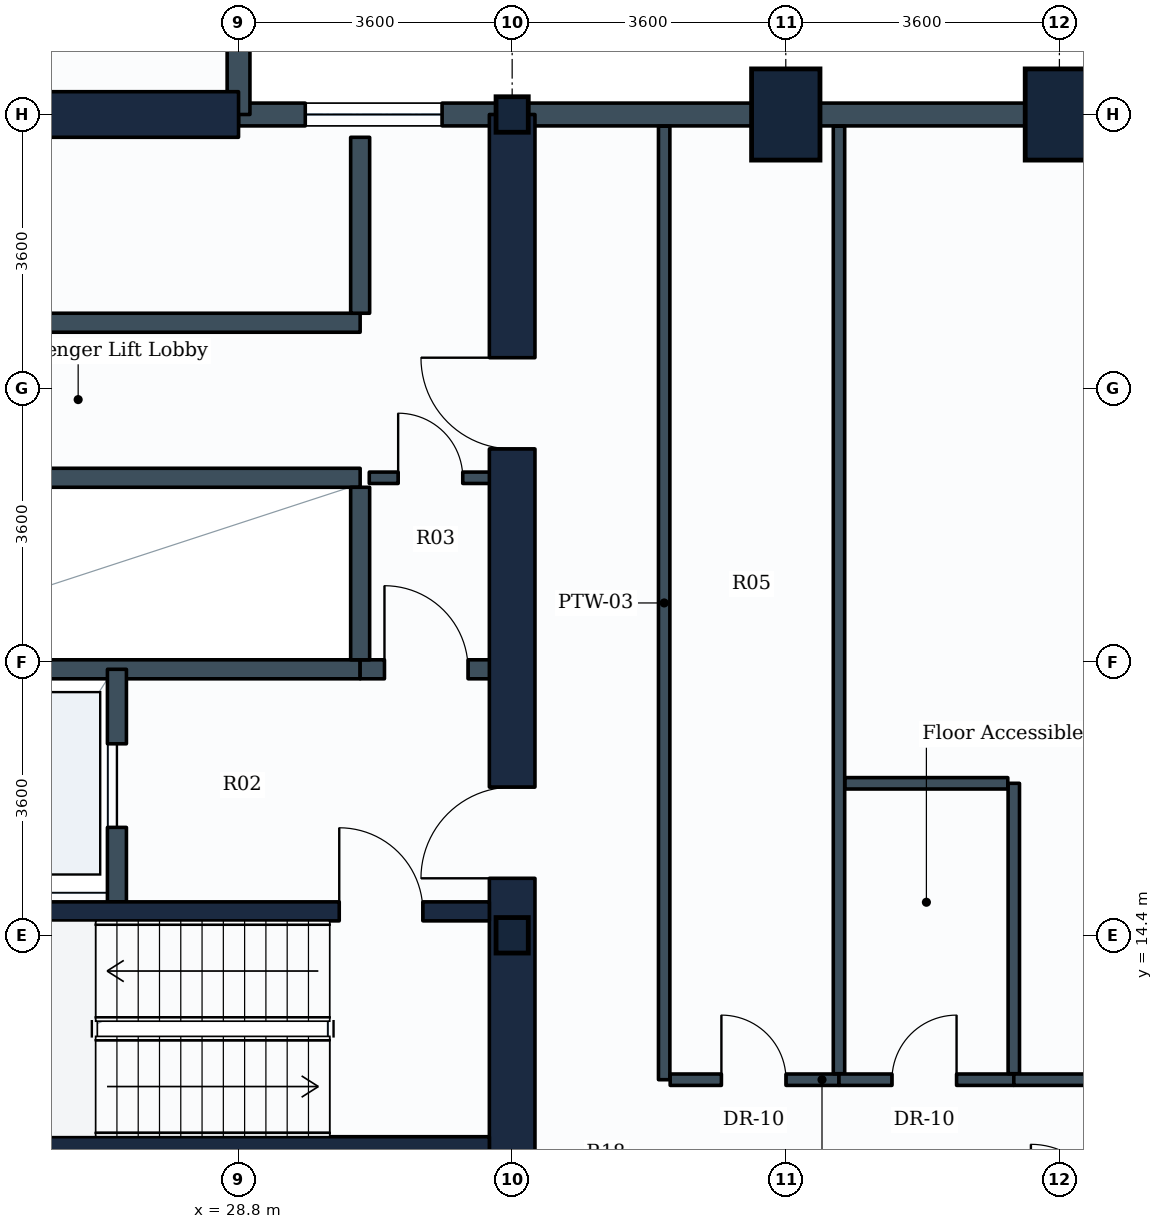
"""IFC4 building model, lengths in metres.
Left out: names, types, materials, properties, quantities, classifications, styles, units other than length and angle.
Written with IfcOpenShell. Run it as: python <this file> out.ifc"""

import sys

from ifc_helpers import new_model, si_unit, direction, frame, frame_2d, origin, origin_2d, place, context, subcontext, project, spatial, rectangle, i_section, extrude, element, fill, save


model = new_model("IFC4")
c1 = context("Model", 3, precision=1e-05, world=origin(), true_north=direction((0.0, 1.0)))
c2 = subcontext(c1, "Body", "Model", "MODEL_VIEW")
j1 = project(units=[si_unit("LENGTHUNIT", "METRE"), si_unit("PLANEANGLEUNIT", "RADIAN")], contexts=[c1])
p1 = place(None, origin())
s1 = spatial("IfcSite", under=j1, at=p1, CompositionType="ELEMENT")
p2 = place(p1, origin())
s2 = spatial("IfcBuilding", under=s1, at=p2, CompositionType="ELEMENT")
p3 = place(p2, frame((0.0, 0.0, 31.8)))
s3 = spatial("IfcBuildingStorey", under=s2, at=p3, CompositionType="ELEMENT", Elevation=31.8)
for number, where, z_axis, x_axis in (
    (1, (32.4, 14.4, 0.0), (0.0, 0.0, 1.0), (1.0, 0.0, 0.0)),
    (2, (32.4, 25.2, 0.0), (0.0, 0.0, 1.0), (1.0, 0.0, 0.0)),
):
    element("IfcColumn", number, at=place(p3, frame(where, z_axis=z_axis, x_axis=x_axis)), inside=s3, PredefinedType="COLUMN", context=c2, shape_type="SweptSolid", body=[
        extrude(i_section(OverallWidth=0.424, OverallDepth=0.467, WebThickness=0.033, FlangeThickness=0.053, FilletRadius=0.015, at=origin_2d()), origin(), (0.0, 0.0, 1.0), 3.9),
    ])
for number, where, z_axis, x_axis in (
    (3, (36.0, 25.2, 0.0), (0.0, 0.0, 1.0), (1.0, 0.0, 0.0)),
    (4, (39.6, 25.2, 0.0), (0.0, 0.0, 1.0), (1.0, 0.0, 0.0)),
):
    element("IfcColumn", number, at=place(p3, frame(where, z_axis=z_axis, x_axis=x_axis)), inside=s3, PredefinedType="COLUMN", context=c2, shape_type="SweptSolid", body=[
        extrude(rectangle(XDim=0.9, YDim=1.2, at=origin_2d()), origin(), (0.0, 0.0, 1.0), 3.9),
    ])
p4 = place(p3, frame((39.6, 25.2, 0.0), z_axis=(0.0, 0.0, 1.0), x_axis=(1.0, 0.0, 0.0)))
e5 = element("IfcWall", 5, at=p4, inside=s3, PredefinedType="STANDARD", context=c2, shape_type="SweptSolid", body=[
    extrude(rectangle(XDim=3.6, YDim=0.3, at=frame_2d((1.8, 0.0))), origin(), (0.0, 0.0, 1.0), 2.93),
])
p5 = place(p4, frame((0.9, 0.0, 0.85)))
e6 = element("IfcOpeningElement", 6, at=p5, cuts=e5, PredefinedType="OPENING", context=c2, shape_type="SweptSolid", body=[
    extrude(rectangle(XDim=1.8, YDim=1.35, at=frame_2d((0.9, 0.675))), frame((0.0, 0.16, 0.0), z_axis=(0.0, -1.0, 0.0), x_axis=(1.0, 0.0, 0.0)), (0.0, 0.0, 1.0), 0.32),
])
for number, where, z_axis, x_axis in (
    (7, (36.0, 25.2, 0.0), (0.0, 0.0, 1.0), (1.0, 0.0, 0.0)),
    (8, (32.4, 25.2, 0.0), (0.0, 0.0, 1.0), (1.0, 0.0, 0.0)),
):
    element("IfcWall", number, at=place(p3, frame(where, z_axis=z_axis, x_axis=x_axis)), inside=s3, PredefinedType="STANDARD", context=c2, shape_type="SweptSolid", body=[
        extrude(rectangle(XDim=3.6, YDim=0.3, at=frame_2d((1.8, 0.0))), origin(), (0.0, 0.0, 1.0), 2.93),
    ])
p6 = place(p3, frame((28.8, 25.2, 0.0), z_axis=(0.0, 0.0, 1.0), x_axis=(1.0, 0.0, 0.0)))
e9 = element("IfcWall", 9, at=p6, inside=s3, PredefinedType="STANDARD", context=c2, shape_type="SweptSolid", body=[
    extrude(rectangle(XDim=3.6, YDim=0.3, at=frame_2d((1.8, 0.0))), origin(), (0.0, 0.0, 1.0), 3.635),
])
p7 = place(p6, frame((0.878, 0.0, 0.85)))
e10 = element("IfcOpeningElement", 10, at=p7, cuts=e9, PredefinedType="OPENING", context=c2, shape_type="SweptSolid", body=[
    extrude(rectangle(XDim=1.8, YDim=1.35, at=frame_2d((0.9, 0.675))), frame((0.0, 0.16, 0.0), z_axis=(0.0, -1.0, 0.0), x_axis=(1.0, 0.0, 0.0)), (0.0, 0.0, 1.0), 0.32),
])
p8 = place(p3, frame((28.8, 25.2, 0.0), z_axis=(0.0, 0.0, 1.0), x_axis=(0.0, 1.0, 0.0)))
e11 = element("IfcWall", 11, at=p8, inside=s3, PredefinedType="STANDARD", context=c2, shape_type="SweptSolid", body=[
    extrude(rectangle(XDim=3.6, YDim=0.3, at=frame_2d((1.8, 0.0))), origin(), (0.0, 0.0, 1.0), 3.14),
])
p9 = place(p3, frame((14.4, 25.2, 0.0), z_axis=(0.0, 0.0, 1.0), x_axis=(1.0, 0.0, 0.0)))
e12 = element("IfcWall", 12, at=p9, inside=s3, PredefinedType="SHEAR", context=c2, shape_type="SweptSolid", body=[
    extrude(rectangle(XDim=14.4, YDim=0.6, at=frame_2d((7.2, 0.0))), origin(), (0.0, 0.0, 1.0), 3.65),
])
p10 = place(p3, frame((32.4, 10.8, 0.0), z_axis=(0.0, 0.0, 1.0), x_axis=(0.0, 1.0, 0.0)))
e13 = element("IfcWall", 13, at=p10, inside=s3, PredefinedType="SHEAR", context=c2, shape_type="SweptSolid", body=[
    extrude(rectangle(XDim=14.4, YDim=0.6, at=frame_2d((7.2, 0.0))), origin(), (0.0, 0.0, 1.0), 3.65),
])
p11 = place(p10, frame((4.35, 0.0, 0.0)))
e14 = element("IfcOpeningElement", 14, at=p11, cuts=e13, PredefinedType="OPENING", context=c2, shape_type="SweptSolid", body=[
    extrude(rectangle(XDim=1.2, YDim=2.1, at=frame_2d((0.6, 1.05))), frame((0.0, 0.31, 0.0), z_axis=(0.0, -1.0, 0.0), x_axis=(1.0, 0.0, 0.0)), (0.0, 0.0, 1.0), 0.62),
])
p12 = place(p10, frame((10.0, 0.0, 0.0)))
e15 = element("IfcOpeningElement", 15, at=p12, cuts=e13, PredefinedType="OPENING", context=c2, shape_type="SweptSolid", body=[
    extrude(rectangle(XDim=1.2, YDim=2.1, at=frame_2d((0.6, 1.05))), frame((0.0, 0.31, 0.0), z_axis=(0.0, -1.0, 0.0), x_axis=(1.0, 0.0, 0.0)), (0.0, 0.0, 1.0), 0.62),
])
p13 = place(p3, frame((23.35, 11.625, 0.0), z_axis=(0.0, 0.0, 1.0), x_axis=(1.0, 0.0, 0.0)))
e16 = element("IfcWall", 16, at=p13, inside=s3, PredefinedType="SHEAR", context=c2, shape_type="SweptSolid", body=[
    extrude(rectangle(XDim=8.75, YDim=0.25, at=frame_2d((4.375, 0.0))), origin(), (0.0, 0.0, 1.0), 3.65),
])
p14 = place(p3, frame((23.35, 14.715, 0.0), z_axis=(0.0, 0.0, 1.0), x_axis=(1.0, 0.0, 0.0)))
e17 = element("IfcWall", 17, at=p14, inside=s3, PredefinedType="SHEAR", context=c2, shape_type="SweptSolid", body=[
    extrude(rectangle(XDim=8.75, YDim=0.25, at=frame_2d((4.375, 0.0))), origin(), (0.0, 0.0, 1.0), 3.65),
])
p15 = place(p14, frame((6.775, 0.0, 0.0)))
e18 = element("IfcOpeningElement", 18, at=p15, cuts=e17, PredefinedType="OPENING", context=c2, shape_type="SweptSolid", body=[
    extrude(rectangle(XDim=1.1, YDim=2.1, at=frame_2d((0.55, 1.05))), frame((0.0, 0.135, 0.0), z_axis=(0.0, -1.0, 0.0), x_axis=(1.0, 0.0, 0.0)), (0.0, 0.0, 1.0), 0.27),
])
p16 = place(p3, frame((21.88, 17.9, 0.0), z_axis=(0.0, 0.0, 1.0), x_axis=(1.0, 0.0, 0.0)))
e19 = element("IfcWall", 19, at=p16, inside=s3, PredefinedType="PARTITIONING", context=c2, shape_type="SweptSolid", body=[
    extrude(rectangle(XDim=8.52, YDim=0.25, at=frame_2d((4.26, 0.0))), origin(), (0.0, 0.0, 1.0), 3.635),
])
p17 = place(p3, frame((30.4, 17.9, 0.0), z_axis=(0.0, 0.0, 1.0), x_axis=(1.0, 0.0, 0.0)))
e20 = element("IfcWall", 20, at=p17, inside=s3, PredefinedType="PARTITIONING", context=c2, shape_type="SweptSolid", body=[
    extrude(rectangle(XDim=1.75, YDim=0.25, at=frame_2d((0.875, 0.0))), origin(), (0.0, 0.0, 1.0), 3.635),
])
p18 = place(p17, frame((0.32, 0.0, 0.0)))
e21 = element("IfcOpeningElement", 21, at=p18, cuts=e20, PredefinedType="OPENING", context=c2, shape_type="SweptSolid", body=[
    extrude(rectangle(XDim=1.1, YDim=2.1, at=frame_2d((0.55, 1.05))), frame((0.0, 0.135, 0.0), z_axis=(0.0, -1.0, 0.0), x_axis=(1.0, 0.0, 0.0)), (0.0, 0.0, 1.0), 0.27),
])
p19 = place(p3, frame((27.2, 14.84, 0.0), z_axis=(0.0, 0.0, 1.0), x_axis=(0.0, 1.0, 0.0)))
e22 = element("IfcWall", 22, at=p19, inside=s3, PredefinedType="PARTITIONING", context=c2, shape_type="SweptSolid", body=[
    extrude(rectangle(XDim=3.06, YDim=0.25, at=frame_2d((1.53, 0.0))), origin(), (0.0, 0.0, 1.0), 3.635),
])
p20 = place(p19, frame((0.98, 0.0, 0.0)))
e23 = element("IfcOpeningElement", 23, at=p20, cuts=e22, PredefinedType="OPENING", context=c2, shape_type="SweptSolid", body=[
    extrude(rectangle(XDim=1.1, YDim=2.1, at=frame_2d((0.55, 1.05))), frame((0.0, 0.135, 0.0), z_axis=(0.0, -1.0, 0.0), x_axis=(1.0, 0.0, 0.0)), (0.0, 0.0, 1.0), 0.27),
])
p21 = place(p3, frame((23.18, 20.42, 0.0), z_axis=(0.0, 0.0, 1.0), x_axis=(1.0, 0.0, 0.0)))
e24 = element("IfcWall", 24, at=p21, inside=s3, PredefinedType="PARTITIONING", context=c2, shape_type="SweptSolid", body=[
    extrude(rectangle(XDim=7.22, YDim=0.25, at=frame_2d((3.61, 0.0))), origin(), (0.0, 0.0, 1.0), 3.635),
])
p22 = place(p3, frame((30.4, 18.025, 0.0), z_axis=(0.0, 0.0, 1.0), x_axis=(0.0, 1.0, 0.0)))
e25 = element("IfcWall", 25, at=p22, inside=s3, PredefinedType="PARTITIONING", context=c2, shape_type="SweptSolid", body=[
    extrude(rectangle(XDim=2.27, YDim=0.25, at=frame_2d((1.135, 0.0))), origin(), (0.0, 0.0, 1.0), 3.635),
])
p23 = place(p3, frame((23.18, 22.46, 0.0), z_axis=(0.0, 0.0, 1.0), x_axis=(1.0, 0.0, 0.0)))
e26 = element("IfcWall", 26, at=p23, inside=s3, PredefinedType="PARTITIONING", context=c2, shape_type="SweptSolid", body=[
    extrude(rectangle(XDim=7.22, YDim=0.25, at=frame_2d((3.61, 0.0))), origin(), (0.0, 0.0, 1.0), 3.635),
])
p24 = place(p3, frame((30.4, 22.585, 0.0), z_axis=(0.0, 0.0, 1.0), x_axis=(0.0, 1.0, 0.0)))
e27 = element("IfcWall", 27, at=p24, inside=s3, PredefinedType="PARTITIONING", context=c2, shape_type="SweptSolid", body=[
    extrude(rectangle(XDim=2.315, YDim=0.25, at=frame_2d((1.157, 0.0))), origin(), (0.0, 0.0, 1.0), 3.635),
])
p25 = place(p3, frame((30.52, 20.42, 0.0), z_axis=(0.0, 0.0, 1.0), x_axis=(1.0, 0.0, 0.0)))
e28 = element("IfcWall", 28, at=p25, inside=s3, PredefinedType="PARTITIONING", context=c2, shape_type="SweptSolid", body=[
    extrude(rectangle(XDim=1.63, YDim=0.15, at=frame_2d((0.815, 0.0))), origin(), (0.0, 0.0, 1.0), 3.635),
])
p26 = place(p25, frame((0.38, 0.0, 0.0)))
e29 = element("IfcOpeningElement", 29, at=p26, cuts=e28, PredefinedType="OPENING", context=c2, shape_type="SweptSolid", body=[
    extrude(rectangle(XDim=0.85, YDim=2.1, at=frame_2d((0.425, 1.05))), frame((0.0, 0.085, 0.0), z_axis=(0.0, -1.0, 0.0), x_axis=(1.0, 0.0, 0.0)), (0.0, 0.0, 1.0), 0.17),
])
p27 = place(p3, frame((34.4, 12.5, 0.0), z_axis=(0.0, 0.0, 1.0), x_axis=(0.0, 1.0, 0.0)))
e30 = element("IfcWall", 30, at=p27, inside=s3, PredefinedType="PARTITIONING", context=c2, shape_type="SweptSolid", body=[
    extrude(rectangle(XDim=12.546, YDim=0.15, at=frame_2d((6.273, 0.0))), origin(), (0.0, 0.0, 1.0), 2.93),
])
p28 = place(p3, frame((34.479, 12.5, 0.0), z_axis=(0.0, 0.0, 1.0), x_axis=(1.0, 0.0, 0.0)))
e31 = element("IfcWall", 31, at=p28, inside=s3, PredefinedType="PARTITIONING", context=c2, shape_type="SweptSolid", body=[
    extrude(rectangle(XDim=2.221, YDim=0.15, at=frame_2d((1.11, 0.0))), origin(), (0.0, 0.0, 1.0), 3.08),
])
p29 = place(p28, frame((0.674, 0.0, 0.0)))
e32 = element("IfcOpeningElement", 32, at=p29, cuts=e31, PredefinedType="OPENING", context=c2, shape_type="SweptSolid", body=[
    extrude(rectangle(XDim=0.85, YDim=2.1, at=frame_2d((0.425, 1.05))), frame((0.0, 0.085, 0.0), z_axis=(0.0, -1.0, 0.0), x_axis=(1.0, 0.0, 0.0)), (0.0, 0.0, 1.0), 0.17),
])
p30 = place(p3, frame((36.7, 12.579, 0.0), z_axis=(0.0, 0.0, 1.0), x_axis=(0.0, 1.0, 0.0)))
e33 = element("IfcWall", 33, at=p30, inside=s3, PredefinedType="PARTITIONING", context=c2, shape_type="SweptSolid", body=[
    extrude(rectangle(XDim=12.467, YDim=0.15, at=frame_2d((6.233, 0.0))), origin(), (0.0, 0.0, 1.0), 2.93),
])
p31 = place(p3, frame((36.7, 12.5, 0.0), z_axis=(0.0, 0.0, 1.0), x_axis=(1.0, 0.0, 0.0)))
e34 = element("IfcWall", 34, at=p31, inside=s3, PredefinedType="PARTITIONING", context=c2, shape_type="SweptSolid", body=[
    extrude(rectangle(XDim=2.3, YDim=0.15, at=frame_2d((1.15, 0.0))), origin(), (0.0, 0.0, 1.0), 3.635),
])
p32 = place(p31, frame((0.697, 0.0, 0.0)))
e35 = element("IfcOpeningElement", 35, at=p32, cuts=e34, PredefinedType="OPENING", context=c2, shape_type="SweptSolid", body=[
    extrude(rectangle(XDim=0.85, YDim=2.1, at=frame_2d((0.425, 1.05))), frame((0.0, 0.085, 0.0), z_axis=(0.0, -1.0, 0.0), x_axis=(1.0, 0.0, 0.0)), (0.0, 0.0, 1.0), 0.17),
])
p33 = place(p3, frame((39.0, 12.579, 0.0), z_axis=(0.0, 0.0, 1.0), x_axis=(0.0, 1.0, 0.0)))
e36 = element("IfcWall", 36, at=p33, inside=s3, PredefinedType="PARTITIONING", context=c2, shape_type="SweptSolid", body=[
    extrude(rectangle(XDim=3.821, YDim=0.15, at=frame_2d((1.91, 0.0))), origin(), (0.0, 0.0, 1.0), 3.08),
])
p34 = place(p3, frame((36.779, 16.4, 0.0), z_axis=(0.0, 0.0, 1.0), x_axis=(1.0, 0.0, 0.0)))
e37 = element("IfcWall", 37, at=p34, inside=s3, PredefinedType="PARTITIONING", context=c2, shape_type="SweptSolid", body=[
    extrude(rectangle(XDim=2.142, YDim=0.15, at=frame_2d((1.071, 0.0))), origin(), (0.0, 0.0, 1.0), 3.635),
])
p35 = place(p3, frame((39.0, 12.5, 0.0), z_axis=(0.0, 0.0, 1.0), x_axis=(1.0, 0.0, 0.0)))
e38 = element("IfcWall", 38, at=p35, inside=s3, PredefinedType="PARTITIONING", context=c2, shape_type="SweptSolid", body=[
    extrude(rectangle(XDim=8.661, YDim=0.15, at=frame_2d((4.331, 0.0))), origin(), (0.0, 0.0, 1.0), 3.04),
])
p36 = place(p35, frame((6.742, 0.0, 0.0)))
e39 = element("IfcOpeningElement", 39, at=p36, cuts=e38, PredefinedType="OPENING", context=c2, shape_type="SweptSolid", body=[
    extrude(rectangle(XDim=1.0, YDim=2.1, at=frame_2d((0.5, 1.05))), frame((0.0, 0.085, 0.0), z_axis=(0.0, -1.0, 0.0), x_axis=(1.0, 0.0, 0.0)), (0.0, 0.0, 1.0), 0.17),
])
p37 = place(p7, origin())
e40 = element("IfcWindow", 40, at=p37, inside=s3, PartitioningType="SINGLE_PANEL", PredefinedType="WINDOW", context=c2, shape_type="SweptSolid", body=[
    extrude(rectangle(XDim=1.8, YDim=1.35, at=frame_2d((0.9, 0.675))), frame((0.0, 0.03, 0.0), z_axis=(0.0, -1.0, 0.0), x_axis=(1.0, 0.0, 0.0)), (0.0, 0.0, 1.0), 0.06),
])
fill(e10, e40)
p38 = place(p15, origin())
e41 = element("IfcDoor", 41, at=p38, inside=s3, OperationType="SINGLE_SWING_LEFT", PredefinedType="DOOR", context=c2, shape_type="SweptSolid", body=[
    extrude(rectangle(XDim=1.1, YDim=2.1, at=frame_2d((0.55, 1.05))), frame((0.0, 0.025, 0.0), z_axis=(0.0, -1.0, 0.0), x_axis=(1.0, 0.0, 0.0)), (0.0, 0.0, 1.0), 0.05),
])
fill(e18, e41)
p39 = place(p20, origin())
e42 = element("IfcDoor", 42, at=p39, inside=s3, OperationType="SLIDING_TO_LEFT", PredefinedType="DOOR", context=c2, shape_type="SweptSolid", body=[
    extrude(rectangle(XDim=1.1, YDim=2.1, at=frame_2d((0.55, 1.05))), frame((0.0, 0.025, 0.0), z_axis=(0.0, -1.0, 0.0), x_axis=(1.0, 0.0, 0.0)), (0.0, 0.0, 1.0), 0.05),
])
fill(e23, e42)
p40 = place(p11, origin())
e43 = element("IfcDoor", 43, at=p40, inside=s3, OperationType="SINGLE_SWING_LEFT", PredefinedType="DOOR", context=c2, shape_type="SweptSolid", body=[
    extrude(rectangle(XDim=1.2, YDim=2.1, at=frame_2d((0.6, 1.05))), frame((0.0, 0.025, 0.0), z_axis=(0.0, -1.0, 0.0), x_axis=(1.0, 0.0, 0.0)), (0.0, 0.0, 1.0), 0.05),
])
fill(e14, e43)
p41 = place(p18, origin())
e44 = element("IfcDoor", 44, at=p41, inside=s3, OperationType="SINGLE_SWING_LEFT", PredefinedType="DOOR", context=c2, shape_type="SweptSolid", body=[
    extrude(rectangle(XDim=1.1, YDim=2.1, at=frame_2d((0.55, 1.05))), frame((0.0, 0.025, 0.0), z_axis=(0.0, -1.0, 0.0), x_axis=(1.0, 0.0, 0.0)), (0.0, 0.0, 1.0), 0.05),
])
fill(e21, e44)
p42 = place(p12, origin())
e45 = element("IfcDoor", 45, at=p42, inside=s3, OperationType="SINGLE_SWING_RIGHT", PredefinedType="DOOR", context=c2, shape_type="SweptSolid", body=[
    extrude(rectangle(XDim=1.2, YDim=2.1, at=frame_2d((0.6, 1.05))), frame((0.0, 0.025, 0.0), z_axis=(0.0, -1.0, 0.0), x_axis=(1.0, 0.0, 0.0)), (0.0, 0.0, 1.0), 0.05),
])
fill(e15, e45)
p43 = place(p26, origin())
e46 = element("IfcDoor", 46, at=p43, inside=s3, OperationType="SINGLE_SWING_LEFT", PredefinedType="DOOR", context=c2, shape_type="SweptSolid", body=[
    extrude(rectangle(XDim=0.85, YDim=2.1, at=frame_2d((0.425, 1.05))), frame((0.0, 0.025, 0.0), z_axis=(0.0, -1.0, 0.0), x_axis=(1.0, 0.0, 0.0)), (0.0, 0.0, 1.0), 0.05),
])
fill(e29, e46)
p44 = place(p29, origin())
e47 = element("IfcDoor", 47, at=p44, inside=s3, OperationType="SINGLE_SWING_LEFT", PredefinedType="DOOR", context=c2, shape_type="SweptSolid", body=[
    extrude(rectangle(XDim=0.85, YDim=2.1, at=frame_2d((0.425, 1.05))), frame((0.0, 0.025, 0.0), z_axis=(0.0, -1.0, 0.0), x_axis=(1.0, 0.0, 0.0)), (0.0, 0.0, 1.0), 0.05),
])
fill(e32, e47)
p45 = place(p32, origin())
e48 = element("IfcDoor", 48, at=p45, inside=s3, OperationType="SINGLE_SWING_RIGHT", PredefinedType="DOOR", context=c2, shape_type="SweptSolid", body=[
    extrude(rectangle(XDim=0.85, YDim=2.1, at=frame_2d((0.425, 1.05))), frame((0.0, 0.025, 0.0), z_axis=(0.0, -1.0, 0.0), x_axis=(1.0, 0.0, 0.0)), (0.0, 0.0, 1.0), 0.05),
])
fill(e35, e48)
save(model, sys.argv[1])
